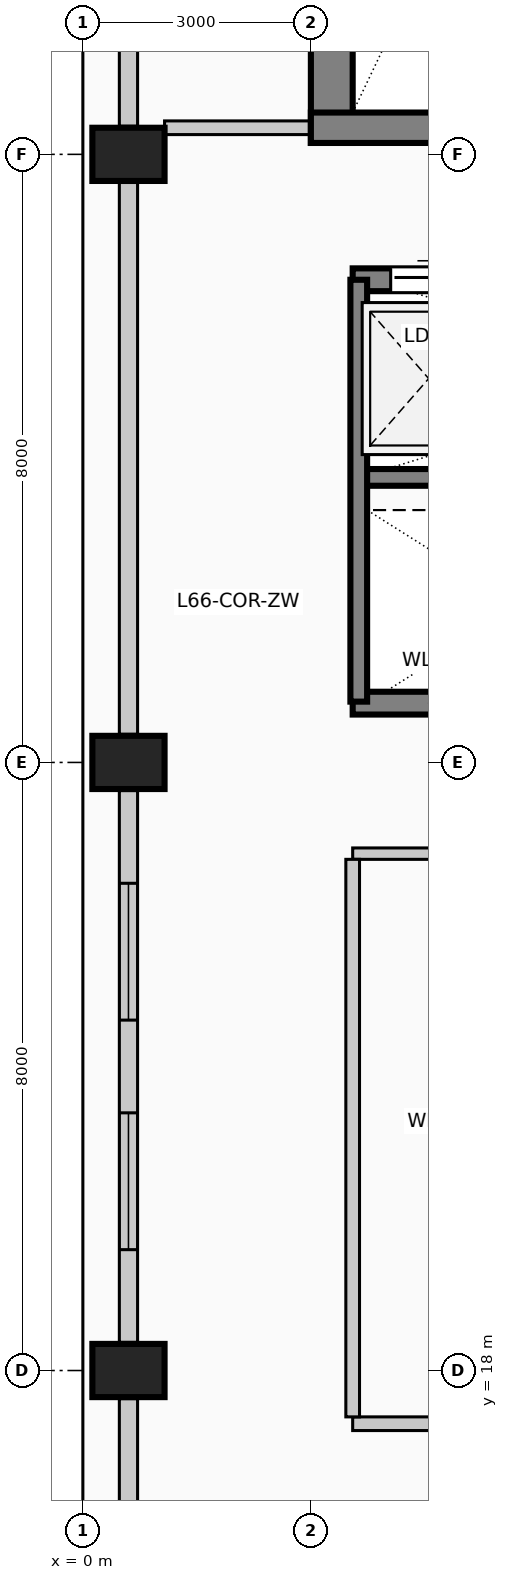
"""IFC4 building model, lengths in metres.
Left out: names, types, materials, properties, quantities, classifications, styles, units other than length and angle.
Written with IfcOpenShell. Run it as: python <this file> out.ifc"""

import sys

from ifc_helpers import new_model, si_unit, direction, frame, frame_2d, origin, origin_2d, place, context, subcontext, project, spatial, rectangle, extrude, element, fill, save


model = new_model("IFC4")
c1 = context("Model", 3, precision=1e-05, world=origin(), true_north=direction((0.0, 1.0)))
c2 = subcontext(c1, "Body", "Model", "MODEL_VIEW")
j1 = project(units=[si_unit("LENGTHUNIT", "METRE"), si_unit("PLANEANGLEUNIT", "RADIAN")], contexts=[c1])
p1 = place(None, origin())
s1 = spatial("IfcSite", under=j1, at=p1, CompositionType="ELEMENT")
p2 = place(p1, origin())
s2 = spatial("IfcBuilding", under=s1, at=p2, CompositionType="ELEMENT")
p3 = place(p2, frame((0.0, 0.0, 272.6)))
s3 = spatial("IfcBuildingStorey", under=s2, at=p3, CompositionType="ELEMENT", Elevation=272.6)
p4 = place(p3, frame((3.275, 34.15, 0.0), z_axis=(0.0, 0.0, 1.0), x_axis=(0.0, 1.0, 0.0)))
e1 = element("IfcWall", 1, at=p4, inside=s3, PredefinedType="SHEAR", context=c2, shape_type="SweptSolid", body=[
    extrude(rectangle(XDim=8.83, YDim=0.55, at=frame_2d((4.415, 0.0))), origin(), (0.0, 0.0, 1.0), 4.0),
])
p5 = place(p3, frame((3.0, 34.35, 0.0), z_axis=(0.0, 0.0, 1.0), x_axis=(1.0, 0.0, 0.0)))
e2 = element("IfcWall", 2, at=p5, inside=s3, PredefinedType="SHEAR", context=c2, shape_type="SweptSolid", body=[
    extrude(rectangle(XDim=4.71, YDim=0.4, at=frame_2d((2.355, 0.0))), origin(), (0.0, 0.0, 1.0), 4.0),
])
p6 = place(p5, frame((2.4, 0.0, 0.0)))
e3 = element("IfcOpeningElement", 3, at=p6, cuts=e2, PredefinedType="OPENING", context=c2, shape_type="SweptSolid", body=[
    extrude(rectangle(XDim=1.15, YDim=2.2, at=frame_2d((0.575, 1.1))), frame((0.0, 0.21, 0.0), z_axis=(0.0, -1.0, 0.0), x_axis=(1.0, 0.0, 0.0)), (0.0, 0.0, 1.0), 0.42),
])
for number, where, z_axis, x_axis in (
    (4, (0.6, 18.0, 0.0), (0.0, 0.0, 1.0), (0.0, 1.0, 0.0)),
    (5, (0.6, 26.0, 0.0), (0.0, 0.0, 1.0), (0.0, 1.0, 0.0)),
    (6, (0.6, 34.0, 0.0), (0.0, 0.0, 1.0), (0.0, 1.0, 0.0)),
):
    element("IfcColumn", number, at=place(p3, frame(where, z_axis=z_axis, x_axis=x_axis)), inside=s3, PredefinedType="COLUMN", context=c2, shape_type="SweptSolid", body=[
        extrude(rectangle(XDim=0.7, YDim=0.95, at=origin_2d()), origin(), (0.0, 0.0, 1.0), 4.0),
    ])
p7 = place(p3, frame((0.6, 10.37, 0.0), z_axis=(0.0, 0.0, 1.0), x_axis=(0.0, 1.0, 0.0)))
e7 = element("IfcWall", 7, at=p7, inside=s3, PredefinedType="SOLIDWALL", context=c2, shape_type="SweptSolid", body=[
    extrude(rectangle(XDim=7.26, YDim=0.24, at=frame_2d((3.63, 0.0))), origin(), (0.0, 0.0, 1.0), 3.0),
])
p8 = place(p7, frame((1.22, 0.0, 0.42)))
e8 = element("IfcOpeningElement", 8, at=p8, cuts=e7, PredefinedType="OPENING", context=c2, shape_type="SweptSolid", body=[
    extrude(rectangle(XDim=1.8, YDim=2.2, at=frame_2d((0.9, 1.1))), frame((0.0, 0.13, 0.0), z_axis=(0.0, -1.0, 0.0), x_axis=(1.0, 0.0, 0.0)), (0.0, 0.0, 1.0), 0.26),
])
p9 = place(p3, frame((0.6, 18.37, 0.0), z_axis=(0.0, 0.0, 1.0), x_axis=(0.0, 1.0, 0.0)))
e9 = element("IfcWall", 9, at=p9, inside=s3, PredefinedType="SOLIDWALL", context=c2, shape_type="SweptSolid", body=[
    extrude(rectangle(XDim=7.26, YDim=0.24, at=frame_2d((3.63, 0.0))), origin(), (0.0, 0.0, 1.0), 3.0),
])
p10 = place(p9, frame((1.22, 0.0, 0.42)))
e10 = element("IfcOpeningElement", 10, at=p10, cuts=e9, PredefinedType="OPENING", context=c2, shape_type="SweptSolid", body=[
    extrude(rectangle(XDim=1.8, YDim=2.2, at=frame_2d((0.9, 1.1))), frame((0.0, 0.13, 0.0), z_axis=(0.0, -1.0, 0.0), x_axis=(1.0, 0.0, 0.0)), (0.0, 0.0, 1.0), 0.26),
])
p11 = place(p9, frame((4.24, 0.0, 0.42)))
e11 = element("IfcOpeningElement", 11, at=p11, cuts=e9, PredefinedType="OPENING", context=c2, shape_type="SweptSolid", body=[
    extrude(rectangle(XDim=1.8, YDim=2.2, at=frame_2d((0.9, 1.1))), frame((0.0, 0.13, 0.0), z_axis=(0.0, -1.0, 0.0), x_axis=(1.0, 0.0, 0.0)), (0.0, 0.0, 1.0), 0.26),
])
p12 = place(p3, frame((0.6, 26.37, 0.0), z_axis=(0.0, 0.0, 1.0), x_axis=(0.0, 1.0, 0.0)))
e12 = element("IfcWall", 12, at=p12, inside=s3, PredefinedType="SOLIDWALL", context=c2, shape_type="SweptSolid", body=[
    extrude(rectangle(XDim=7.26, YDim=0.24, at=frame_2d((3.63, 0.0))), origin(), (0.0, 0.0, 1.0), 3.0),
])
p13 = place(p3, frame((0.6, 34.37, 0.0), z_axis=(0.0, 0.0, 1.0), x_axis=(0.0, 1.0, 0.0)))
e13 = element("IfcWall", 13, at=p13, inside=s3, PredefinedType="SOLIDWALL", context=c2, shape_type="SweptSolid", body=[
    extrude(rectangle(XDim=7.66, YDim=0.24, at=frame_2d((3.83, 0.0))), origin(), (0.0, 0.0, 1.0), 3.0),
])
p14 = place(p3, frame((3.55, 32.35, 0.0), z_axis=(0.0, 0.0, 1.0), x_axis=(1.0, 0.0, 0.0)))
e14 = element("IfcWall", 14, at=p14, inside=s3, PredefinedType="SOLIDWALL", context=c2, shape_type="SweptSolid", body=[
    extrude(rectangle(XDim=2.1, YDim=0.3, at=frame_2d((1.05, 0.0))), origin(), (0.0, 0.0, 1.0), 4.0),
])
p15 = place(p14, frame((0.5, 0.0, 0.0)))
e15 = element("IfcOpeningElement", 15, at=p15, cuts=e14, PredefinedType="OPENING", context=c2, shape_type="SweptSolid", body=[
    extrude(rectangle(XDim=1.1, YDim=2.2, at=frame_2d((0.55, 1.1))), frame((0.0, 0.16, 0.0), z_axis=(0.0, -1.0, 0.0), x_axis=(1.0, 0.0, 0.0)), (0.0, 0.0, 1.0), 0.32),
])
p16 = place(p3, frame((5.65, 26.78, 0.0), z_axis=(0.0, 0.0, 1.0), x_axis=(-1.0, 0.0, 0.0)))
e16 = element("IfcWall", 16, at=p16, inside=s3, PredefinedType="SOLIDWALL", context=c2, shape_type="SweptSolid", body=[
    extrude(rectangle(XDim=2.1, YDim=0.3, at=frame_2d((1.05, 0.0))), origin(), (0.0, 0.0, 1.0), 4.0),
])
p17 = place(p3, frame((3.55, 29.75, 0.0), z_axis=(0.0, 0.0, 1.0), x_axis=(1.0, 0.0, 0.0)))
e17 = element("IfcWall", 17, at=p17, inside=s3, PredefinedType="SOLIDWALL", context=c2, shape_type="SweptSolid", body=[
    extrude(rectangle(XDim=8.65, YDim=0.22, at=frame_2d((4.325, 0.0))), origin(), (0.0, 0.0, 1.0), 4.0),
])
p18 = place(p3, frame((3.63, 26.8, 0.0), z_axis=(0.0, 0.0, 1.0), x_axis=(0.0, 1.0, 0.0)))
e18 = element("IfcWall", 18, at=p18, inside=s3, PredefinedType="SOLIDWALL", context=c2, shape_type="SweptSolid", body=[
    extrude(rectangle(XDim=5.55, YDim=0.22, at=frame_2d((2.775, 0.0))), origin(), (0.0, 0.0, 1.0), 4.0),
])
p19 = place(p3, frame((3.55, 17.3, 0.0), z_axis=(0.0, 0.0, 1.0), x_axis=(1.0, 0.0, 0.0)))
e19 = element("IfcWall", 19, at=p19, inside=s3, PredefinedType="PARTITIONING", context=c2, shape_type="SweptSolid", body=[
    extrude(rectangle(XDim=6.25, YDim=0.18, at=frame_2d((3.125, 0.0))), origin(), (0.0, 0.0, 1.0), 3.75),
])
p20 = place(p19, frame((2.65, 0.0, 0.0)))
e20 = element("IfcOpeningElement", 20, at=p20, cuts=e19, PredefinedType="OPENING", context=c2, shape_type="SweptSolid", body=[
    extrude(rectangle(XDim=0.95, YDim=2.15, at=frame_2d((0.475, 1.075))), frame((0.0, 0.1, 0.0), z_axis=(0.0, -1.0, 0.0), x_axis=(1.0, 0.0, 0.0)), (0.0, 0.0, 1.0), 0.2),
])
p21 = place(p3, frame((3.55, 24.8, 0.0), z_axis=(0.0, 0.0, 1.0), x_axis=(1.0, 0.0, 0.0)))
e21 = element("IfcWall", 21, at=p21, inside=s3, PredefinedType="PARTITIONING", context=c2, shape_type="SweptSolid", body=[
    extrude(rectangle(XDim=6.25, YDim=0.15, at=frame_2d((3.125, 0.0))), origin(), (0.0, 0.0, 1.0), 3.75),
])
p22 = place(p3, frame((1.075, 34.35, 0.0), z_axis=(0.0, 0.0, 1.0), x_axis=(1.0, 0.0, 0.0)))
e22 = element("IfcWall", 22, at=p22, inside=s3, PredefinedType="PARTITIONING", context=c2, shape_type="SweptSolid", body=[
    extrude(rectangle(XDim=1.925, YDim=0.18, at=frame_2d((0.962, 0.0))), origin(), (0.0, 0.0, 1.0), 3.75),
])
p23 = place(p3, frame((3.55, 17.39, 0.0), z_axis=(0.0, 0.0, 1.0), x_axis=(0.0, 1.0, 0.0)))
e23 = element("IfcWall", 23, at=p23, inside=s3, PredefinedType="PARTITIONING", context=c2, shape_type="SweptSolid", body=[
    extrude(rectangle(XDim=7.335, YDim=0.18, at=frame_2d((3.667, 0.0))), origin(), (0.0, 0.0, 1.0), 3.75),
])
p24 = place(p10, origin())
e24 = element("IfcWindow", 24, at=p24, inside=s3, PartitioningType="SINGLE_PANEL", PredefinedType="WINDOW", context=c2, shape_type="SweptSolid", body=[
    extrude(rectangle(XDim=1.8, YDim=2.2, at=frame_2d((0.9, 1.1))), frame((0.0, 0.03, 0.0), z_axis=(0.0, -1.0, 0.0), x_axis=(1.0, 0.0, 0.0)), (0.0, 0.0, 1.0), 0.06),
])
fill(e10, e24)
p25 = place(p11, origin())
e25 = element("IfcWindow", 25, at=p25, inside=s3, PartitioningType="SINGLE_PANEL", PredefinedType="WINDOW", context=c2, shape_type="SweptSolid", body=[
    extrude(rectangle(XDim=1.8, YDim=2.2, at=frame_2d((0.9, 1.1))), frame((0.0, 0.03, 0.0), z_axis=(0.0, -1.0, 0.0), x_axis=(1.0, 0.0, 0.0)), (0.0, 0.0, 1.0), 0.06),
])
fill(e11, e25)
p26 = place(p15, origin())
e26 = element("IfcDoor", 26, at=p26, inside=s3, OperationType="SLIDING_TO_LEFT", PredefinedType="DOOR", context=c2, shape_type="SweptSolid", body=[
    extrude(rectangle(XDim=1.1, YDim=2.2, at=frame_2d((0.55, 1.1))), frame((0.0, 0.025, 0.0), z_axis=(0.0, -1.0, 0.0), x_axis=(1.0, 0.0, 0.0)), (0.0, 0.0, 1.0), 0.05),
])
fill(e15, e26)
save(model, sys.argv[1])
